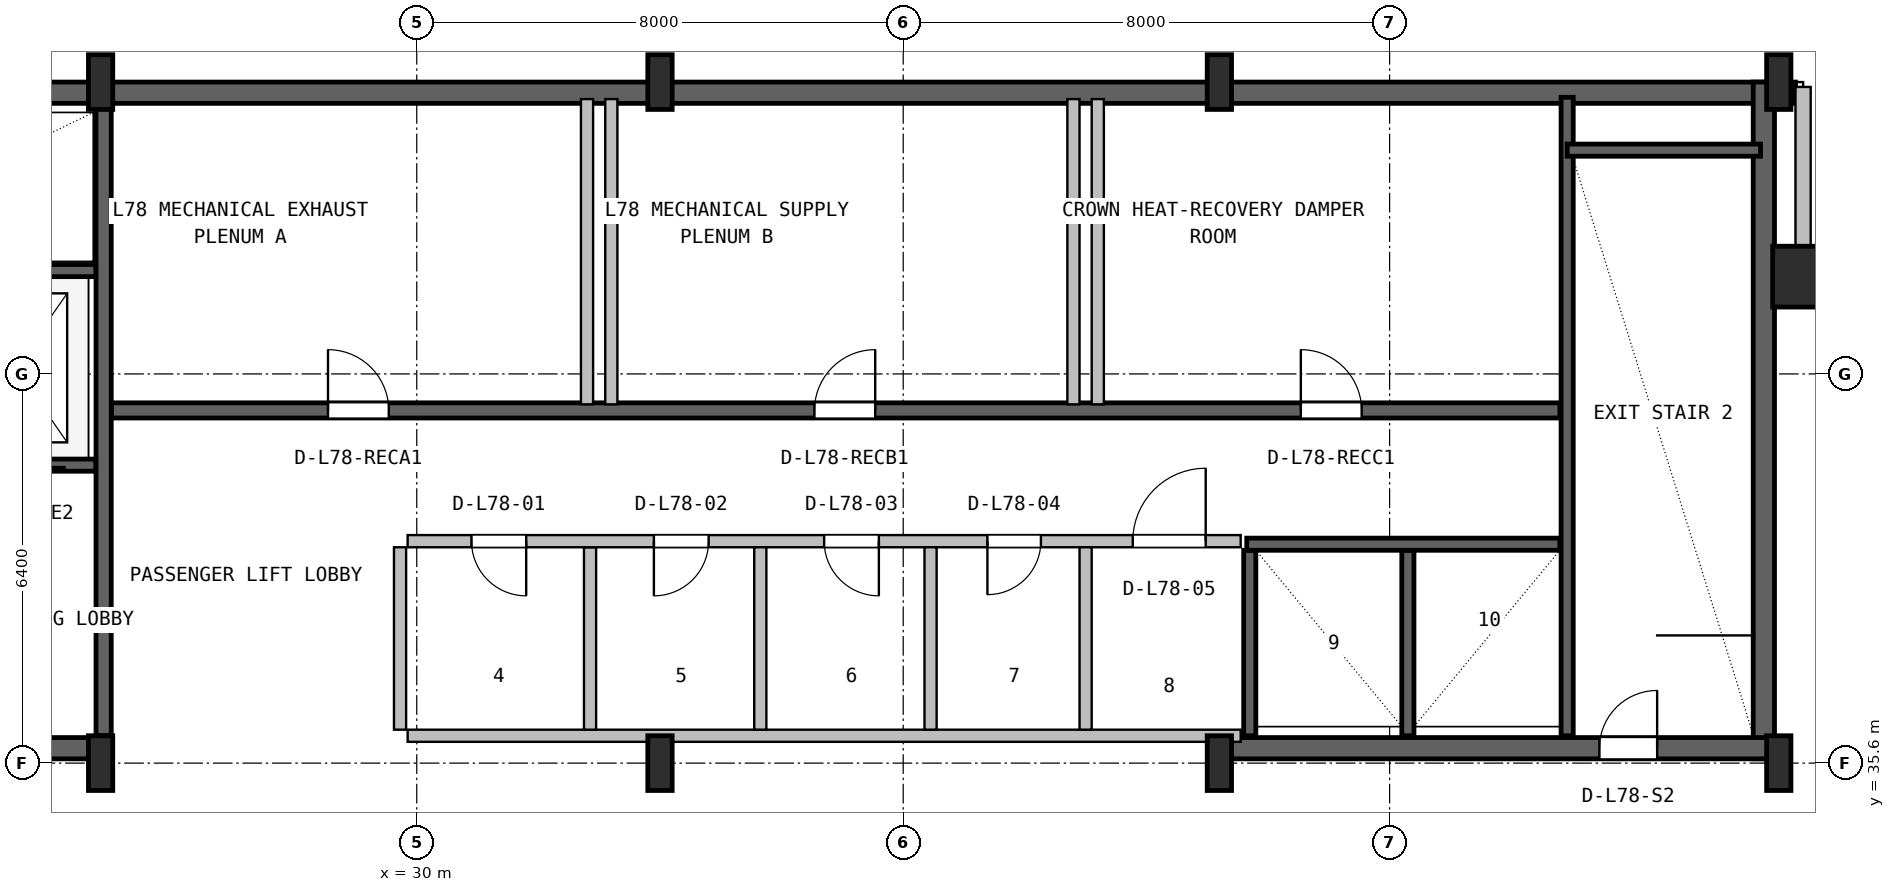
"""IFC4 building model, lengths in metres.
Left out: names, types, materials, properties, quantities, classifications, styles, units other than length and angle.
Written with IfcOpenShell. Run it as: python <this file> out.ifc"""

import sys

from ifc_helpers import new_model, si_unit, direction, frame, frame_2d, origin, origin_2d, place, context, subcontext, project, spatial, rectangle, hollow_rectangle, i_section, extrude, source, transform, mapped, element, fill, save


model = new_model("IFC4")
c1 = context("Model", 3, precision=1e-05, world=origin(), true_north=direction((0.0, 1.0)))
c2 = subcontext(c1, "Body", "Model", "MODEL_VIEW")
j1 = project(units=[si_unit("LENGTHUNIT", "METRE"), si_unit("PLANEANGLEUNIT", "RADIAN")], contexts=[c1])
p1 = place(None, origin())
s1 = spatial("IfcSite", under=j1, at=p1, CompositionType="ELEMENT")
p2 = place(p1, origin())
s2 = spatial("IfcBuilding", under=s1, at=p2, CompositionType="ELEMENT")
p3 = place(p2, frame((0.0, 0.0, 314.6)))
s3 = spatial("IfcBuildingStorey", under=s2, at=p3, CompositionType="ELEMENT", Elevation=314.6)
p4 = place(p3, frame((15.325, 46.625, 0.0), z_axis=(0.0, 0.0, 1.0), x_axis=(1.0, 0.0, 0.0)))
e1 = element("IfcWall", 1, at=p4, inside=s3, PredefinedType="SHEAR", context=c2, shape_type="SweptSolid", body=[
    extrude(rectangle(XDim=37.35, YDim=0.35, at=frame_2d((18.675, 0.0))), origin(), (0.0, 0.0, 1.0), 4.75),
])
p5 = place(p3, frame((52.155, 35.67, 0.0), z_axis=(0.0, 0.0, 1.0), x_axis=(0.0, 1.0, 0.0)))
e2 = element("IfcWall", 2, at=p5, inside=s3, PredefinedType="SHEAR", context=c2, shape_type="SweptSolid", body=[
    extrude(rectangle(XDim=11.13, YDim=0.35, at=frame_2d((5.565, 0.0))), origin(), (0.0, 0.0, 1.0), 4.75),
])
p6 = place(p3, frame((15.67, 35.845, 0.0), z_axis=(0.0, 0.0, 1.0), x_axis=(1.0, 0.0, 0.0)))
e3 = element("IfcWall", 3, at=p6, inside=s3, PredefinedType="SHEAR", context=c2, shape_type="SweptSolid", body=[
    extrude(rectangle(XDim=9.13, YDim=0.35, at=frame_2d((4.565, 0.0))), origin(), (0.0, 0.0, 1.0), 4.75),
])
p7 = place(p6, frame((5.4, 0.0, 0.0)))
e4 = element("IfcOpeningElement", 4, at=p7, cuts=e3, PredefinedType="OPENING", context=c2, shape_type="SweptSolid", body=[
    extrude(rectangle(XDim=1.0, YDim=2.1, at=frame_2d((0.5, 1.05))), frame((0.0, 0.185, 0.0), z_axis=(0.0, -1.0, 0.0), x_axis=(1.0, 0.0, 0.0)), (0.0, 0.0, 1.0), 0.37),
])
p8 = place(p3, frame((43.2, 35.845, 0.0), z_axis=(0.0, 0.0, 1.0), x_axis=(1.0, 0.0, 0.0)))
e5 = element("IfcWall", 5, at=p8, inside=s3, PredefinedType="SHEAR", context=c2, shape_type="SweptSolid", body=[
    extrude(rectangle(XDim=9.13, YDim=0.35, at=frame_2d((4.565, 0.0))), origin(), (0.0, 0.0, 1.0), 4.75),
])
p9 = place(p8, frame((6.25, 0.0, 0.0)))
e6 = element("IfcOpeningElement", 6, at=p9, cuts=e5, PredefinedType="OPENING", context=c2, shape_type="SweptSolid", body=[
    extrude(rectangle(XDim=0.95, YDim=2.1, at=frame_2d((0.475, 1.05))), frame((0.0, 0.185, 0.0), z_axis=(0.0, -1.0, 0.0), x_axis=(1.0, 0.0, 0.0)), (0.0, 0.0, 1.0), 0.37),
])
m1 = source(origin(), c2, "Body", "SweptSolid", [
    extrude(i_section(OverallWidth=0.4, OverallDepth=0.9, WebThickness=0.016, FlangeThickness=0.028, FilletRadius=0.016, at=origin_2d()), origin(), (0.0, 0.0, 1.0), 5.2),
])
for number, where, z_axis, x_axis in (
    (7, (24.8, 35.6, 0.0), (0.0, 0.0, 1.0), (1.0, 0.0, 0.0)),
    (8, (24.8, 46.8, 0.0), (0.0, 0.0, 1.0), (1.0, 0.0, 0.0)),
    (9, (34.0, 35.6, 0.0), (0.0, 0.0, 1.0), (1.0, 0.0, 0.0)),
    (10, (34.0, 46.8, 0.0), (0.0, 0.0, 1.0), (1.0, 0.0, 0.0)),
    (11, (43.2, 35.6, 0.0), (0.0, 0.0, 1.0), (1.0, 0.0, 0.0)),
    (12, (43.2, 46.8, 0.0), (0.0, 0.0, 1.0), (1.0, 0.0, 0.0)),
    (13, (52.4, 35.6, 0.0), (0.0, 0.0, 1.0), (1.0, 0.0, 0.0)),
    (14, (52.4, 46.8, 0.0), (0.0, 0.0, 1.0), (1.0, 0.0, 0.0)),
):
    element("IfcColumn", number, at=place(p3, frame(where, z_axis=z_axis, x_axis=x_axis)), inside=s3, PredefinedType="COLUMN", context=c2, shape_type="MappedRepresentation", body=[
        mapped(m1, transform((0.0, 0.0, 0.0), x_axis=(1.0, 0.0, 0.0), y_axis=(0.0, 1.0, 0.0), z_axis=(0.0, 0.0, 1.0), scale=1.0)),
    ])
m2 = source(origin(), c2, "Body", "SweptSolid", [
    extrude(hollow_rectangle(XDim=1.0, YDim=1.0, WallThickness=0.04, at=origin_2d()), origin(), (0.0, 0.0, 1.0), 5.2),
])
p10 = place(p3, frame((52.8, 43.6, 0.0), z_axis=(0.0, 0.0, 1.0), x_axis=(1.0, 0.0, 0.0)))
e15 = element("IfcColumn", 15, at=p10, inside=s3, PredefinedType="COLUMN", context=c2, shape_type="MappedRepresentation", body=[
    mapped(m2, transform((0.0, 0.0, 0.0), x_axis=(1.0, 0.0, 0.0), y_axis=(0.0, 1.0, 0.0), z_axis=(0.0, 0.0, 1.0), scale=1.0)),
])
p11 = place(p3, frame((52.93, 43.6, 0.0), z_axis=(0.0, 0.0, 1.0), x_axis=(1.0, 0.0, 0.0)))
e16 = element("IfcWall", 16, at=p11, inside=s3, PredefinedType="SOLIDWALL", context=c2, shape_type="SweptSolid", body=[
    extrude(rectangle(XDim=2.99, YDim=0.25, at=frame_2d((1.495, 0.0))), origin(), (0.0, 0.0, 1.0), 4.73),
])
p12 = place(p3, frame((52.8, 43.52, 0.0), z_axis=(0.0, 0.0, 1.0), x_axis=(0.0, 1.0, 0.0)))
e17 = element("IfcWall", 17, at=p12, inside=s3, PredefinedType="SOLIDWALL", context=c2, shape_type="SweptSolid", body=[
    extrude(rectangle(XDim=3.2, YDim=0.25, at=frame_2d((1.6, 0.0))), origin(), (0.0, 0.0, 1.0), 4.371),
])
p13 = place(p3, frame((24.85, 36.05, 0.0), z_axis=(0.0, 0.0, 1.0), x_axis=(0.0, 1.0, 0.0)))
e18 = element("IfcWall", 18, at=p13, inside=s3, PredefinedType="SHEAR", context=c2, shape_type="SweptSolid", body=[
    extrude(rectangle(XDim=10.45, YDim=0.25, at=frame_2d((5.225, 0.0))), origin(), (0.0, 0.0, 1.0), 4.75),
])
p14 = place(p3, frame((19.2, 40.5, 0.0), z_axis=(0.0, 0.0, 1.0), x_axis=(1.0, 0.0, 0.0)))
e19 = element("IfcWall", 19, at=p14, inside=s3, PredefinedType="SHEAR", context=c2, shape_type="SweptSolid", body=[
    extrude(rectangle(XDim=5.52, YDim=0.2, at=frame_2d((2.76, 0.0))), origin(), (0.0, 0.0, 1.0), 4.75),
])
p15 = place(p14, frame((1.05, 0.0, 0.0)))
e20 = element("IfcOpeningElement", 20, at=p15, cuts=e19, PredefinedType="OPENING", context=c2, shape_type="SweptSolid", body=[
    extrude(rectangle(XDim=1.1, YDim=2.18, at=frame_2d((0.55, 1.09))), frame((0.0, 0.11, 0.0), z_axis=(0.0, -1.0, 0.0), x_axis=(1.0, 0.0, 0.0)), (0.0, 0.0, 1.0), 0.22),
])
p16 = place(p14, frame((3.65, 0.0, 0.0)))
e21 = element("IfcOpeningElement", 21, at=p16, cuts=e19, PredefinedType="OPENING", context=c2, shape_type="SweptSolid", body=[
    extrude(rectangle(XDim=1.1, YDim=2.18, at=frame_2d((0.55, 1.09))), frame((0.0, 0.11, 0.0), z_axis=(0.0, -1.0, 0.0), x_axis=(1.0, 0.0, 0.0)), (0.0, 0.0, 1.0), 0.22),
])
p17 = place(p3, frame((19.2, 43.7, 0.0), z_axis=(0.0, 0.0, 1.0), x_axis=(1.0, 0.0, 0.0)))
e22 = element("IfcWall", 22, at=p17, inside=s3, PredefinedType="SHEAR", context=c2, shape_type="SweptSolid", body=[
    extrude(rectangle(XDim=5.52, YDim=0.2, at=frame_2d((2.76, 0.0))), origin(), (0.0, 0.0, 1.0), 4.75),
])
p18 = place(p3, frame((48.92, 36.05, 0.0), z_axis=(0.0, 0.0, 1.0), x_axis=(0.0, 1.0, 0.0)))
e23 = element("IfcWall", 23, at=p18, inside=s3, PredefinedType="SHEAR", context=c2, shape_type="SweptSolid", body=[
    extrude(rectangle(XDim=10.5, YDim=0.2, at=frame_2d((5.25, 0.0))), origin(), (0.0, 0.0, 1.0), 4.75),
])
p19 = place(p3, frame((48.92, 45.68, 0.0), z_axis=(0.0, 0.0, 1.0), x_axis=(1.0, 0.0, 0.0)))
e24 = element("IfcWall", 24, at=p19, inside=s3, PredefinedType="SHEAR", context=c2, shape_type="SweptSolid", body=[
    extrude(rectangle(XDim=3.18, YDim=0.2, at=frame_2d((1.59, 0.0))), origin(), (0.0, 0.0, 1.0), 4.75),
])
p20 = place(p3, frame((24.98, 41.4, 0.0), z_axis=(0.0, 0.0, 1.0), x_axis=(1.0, 0.0, 0.0)))
e25 = element("IfcWall", 25, at=p20, inside=s3, PredefinedType="SHEAR", context=c2, shape_type="SweptSolid", body=[
    extrude(rectangle(XDim=23.82, YDim=0.25, at=frame_2d((11.91, 0.0))), origin(), (0.0, 0.0, 1.0), 4.75),
])
p21 = place(p20, frame((3.56, 0.0, 0.0)))
e26 = element("IfcOpeningElement", 26, at=p21, cuts=e25, PredefinedType="OPENING", context=c2, shape_type="SweptSolid", body=[
    extrude(rectangle(XDim=1.0, YDim=2.08, at=frame_2d((0.5, 1.04))), frame((0.0, 0.135, 0.0), z_axis=(0.0, -1.0, 0.0), x_axis=(1.0, 0.0, 0.0)), (0.0, 0.0, 1.0), 0.27),
])
p22 = place(p20, frame((11.56, 0.0, 0.0)))
e27 = element("IfcOpeningElement", 27, at=p22, cuts=e25, PredefinedType="OPENING", context=c2, shape_type="SweptSolid", body=[
    extrude(rectangle(XDim=1.0, YDim=2.08, at=frame_2d((0.5, 1.04))), frame((0.0, 0.135, 0.0), z_axis=(0.0, -1.0, 0.0), x_axis=(1.0, 0.0, 0.0)), (0.0, 0.0, 1.0), 0.27),
])
p23 = place(p20, frame((19.56, 0.0, 0.0)))
e28 = element("IfcOpeningElement", 28, at=p23, cuts=e25, PredefinedType="OPENING", context=c2, shape_type="SweptSolid", body=[
    extrude(rectangle(XDim=1.0, YDim=2.08, at=frame_2d((0.5, 1.04))), frame((0.0, 0.135, 0.0), z_axis=(0.0, -1.0, 0.0), x_axis=(1.0, 0.0, 0.0)), (0.0, 0.0, 1.0), 0.27),
])
for number, where, z_axis, x_axis in (
    (29, (43.7, 36.05, 0.0), (0.0, 0.0, 1.0), (0.0, 1.0, 0.0)),
    (30, (46.3, 36.05, 0.0), (0.0, 0.0, 1.0), (0.0, 1.0, 0.0)),
):
    element("IfcWall", number, at=place(p3, frame(where, z_axis=z_axis, x_axis=x_axis)), inside=s3, PredefinedType="SHEAR", context=c2, shape_type="SweptSolid", body=[
        extrude(rectangle(XDim=3.05, YDim=0.2, at=frame_2d((1.525, 0.0))), origin(), (0.0, 0.0, 1.0), 4.75),
    ])
p24 = place(p3, frame((43.65, 39.2, 0.0), z_axis=(0.0, 0.0, 1.0), x_axis=(1.0, 0.0, 0.0)))
e31 = element("IfcWall", 31, at=p24, inside=s3, PredefinedType="SHEAR", context=c2, shape_type="SweptSolid", body=[
    extrude(rectangle(XDim=5.15, YDim=0.2, at=frame_2d((2.575, 0.0))), origin(), (0.0, 0.0, 1.0), 4.75),
])
p25 = place(p3, frame((29.85, 36.05, 0.0), z_axis=(0.0, 0.0, 1.0), x_axis=(1.0, 0.0, 0.0)))
e32 = element("IfcWall", 32, at=p25, inside=s3, PredefinedType="SOLIDWALL", context=c2, shape_type="SweptSolid", body=[
    extrude(rectangle(XDim=13.7, YDim=0.2, at=frame_2d((6.85, 0.0))), origin(), (0.0, 0.0, 1.0), 4.73),
])
p26 = place(p3, frame((32.85, 36.15, 0.0), z_axis=(0.0, 0.0, 1.0), x_axis=(0.0, 1.0, 0.0)))
e33 = element("IfcWall", 33, at=p26, inside=s3, PredefinedType="SOLIDWALL", context=c2, shape_type="SweptSolid", body=[
    extrude(rectangle(XDim=3.0, YDim=0.2, at=frame_2d((1.5, 0.0))), origin(), (0.0, 0.0, 1.0), 4.73),
])
p27 = place(p3, frame((29.85, 39.25, 0.0), z_axis=(0.0, 0.0, 1.0), x_axis=(1.0, 0.0, 0.0)))
e34 = element("IfcWall", 34, at=p27, inside=s3, PredefinedType="SOLIDWALL", context=c2, shape_type="SweptSolid", body=[
    extrude(rectangle(XDim=13.7, YDim=0.2, at=frame_2d((6.85, 0.0))), origin(), (0.0, 0.0, 1.0), 4.73),
])
p28 = place(p27, frame((1.05, 0.0, 0.0)))
e35 = element("IfcOpeningElement", 35, at=p28, cuts=e34, PredefinedType="OPENING", context=c2, shape_type="SweptSolid", body=[
    extrude(rectangle(XDim=0.9, YDim=2.06, at=frame_2d((0.45, 1.03))), frame((0.0, 0.11, 0.0), z_axis=(0.0, -1.0, 0.0), x_axis=(1.0, 0.0, 0.0)), (0.0, 0.0, 1.0), 0.22),
])
p29 = place(p27, frame((4.05, 0.0, 0.0)))
e36 = element("IfcOpeningElement", 36, at=p29, cuts=e34, PredefinedType="OPENING", context=c2, shape_type="SweptSolid", body=[
    extrude(rectangle(XDim=0.9, YDim=2.06, at=frame_2d((0.45, 1.03))), frame((0.0, 0.11, 0.0), z_axis=(0.0, -1.0, 0.0), x_axis=(1.0, 0.0, 0.0)), (0.0, 0.0, 1.0), 0.22),
])
p30 = place(p27, frame((6.85, 0.0, 0.0)))
e37 = element("IfcOpeningElement", 37, at=p30, cuts=e34, PredefinedType="OPENING", context=c2, shape_type="SweptSolid", body=[
    extrude(rectangle(XDim=0.9, YDim=2.06, at=frame_2d((0.45, 1.03))), frame((0.0, 0.11, 0.0), z_axis=(0.0, -1.0, 0.0), x_axis=(1.0, 0.0, 0.0)), (0.0, 0.0, 1.0), 0.22),
])
p31 = place(p27, frame((9.535, 0.0, 0.0)))
e38 = element("IfcOpeningElement", 38, at=p31, cuts=e34, PredefinedType="OPENING", context=c2, shape_type="SweptSolid", body=[
    extrude(rectangle(XDim=0.88, YDim=2.06, at=frame_2d((0.44, 1.03))), frame((0.0, 0.11, 0.0), z_axis=(0.0, -1.0, 0.0), x_axis=(1.0, 0.0, 0.0)), (0.0, 0.0, 1.0), 0.22),
])
p32 = place(p27, frame((11.925, 0.0, 0.0)))
e39 = element("IfcOpeningElement", 39, at=p32, cuts=e34, PredefinedType="OPENING", context=c2, shape_type="SweptSolid", body=[
    extrude(rectangle(XDim=1.2, YDim=2.1, at=frame_2d((0.6, 1.05))), frame((0.0, 0.11, 0.0), z_axis=(0.0, -1.0, 0.0), x_axis=(1.0, 0.0, 0.0)), (0.0, 0.0, 1.0), 0.22),
])
for number, where, z_axis, x_axis in (
    (40, (29.725, 36.15, 0.0), (0.0, 0.0, 1.0), (0.0, 1.0, 0.0)),
    (41, (35.65, 36.15, 0.0), (0.0, 0.0, 1.0), (0.0, 1.0, 0.0)),
    (42, (38.45, 36.15, 0.0), (0.0, 0.0, 1.0), (0.0, 1.0, 0.0)),
    (43, (41.0, 36.15, 0.0), (0.0, 0.0, 1.0), (0.0, 1.0, 0.0)),
):
    element("IfcWall", number, at=place(p3, frame(where, z_axis=z_axis, x_axis=x_axis)), inside=s3, PredefinedType="SOLIDWALL", context=c2, shape_type="SweptSolid", body=[
        extrude(rectangle(XDim=3.0, YDim=0.2, at=frame_2d((1.5, 0.0))), origin(), (0.0, 0.0, 1.0), 4.73),
    ])
for number, where, z_axis, x_axis in (
    (44, (32.8, 41.5, 0.0), (0.0, 0.0, 1.0), (0.0, 1.0, 0.0)),
    (45, (40.8, 41.5, 0.0), (0.0, 0.0, 1.0), (0.0, 1.0, 0.0)),
    (46, (33.2, 41.5, 0.0), (0.0, 0.0, 1.0), (0.0, 1.0, 0.0)),
    (47, (41.2, 41.5, 0.0), (0.0, 0.0, 1.0), (0.0, 1.0, 0.0)),
):
    element("IfcWall", number, at=place(p3, frame(where, z_axis=z_axis, x_axis=x_axis)), inside=s3, PredefinedType="SOLIDWALL", context=c2, shape_type="SweptSolid", body=[
        extrude(rectangle(XDim=5.02, YDim=0.2, at=frame_2d((2.51, 0.0))), origin(), (0.0, 0.0, 1.0), 3.525),
    ])
m3 = source(origin(), c2, "Body", "SweptSolid", [
    extrude(rectangle(XDim=0.95, YDim=2.1, at=frame_2d((0.475, 1.05))), frame((0.0, 0.025, 0.0), z_axis=(0.0, -1.0, 0.0), x_axis=(1.0, 0.0, 0.0)), (0.0, 0.0, 1.0), 0.05),
])
p33 = place(p9, origin())
e48 = element("IfcDoor", 48, at=p33, inside=s3, OperationType="SINGLE_SWING_RIGHT", PredefinedType="DOOR", context=c2, shape_type="MappedRepresentation", body=[
    mapped(m3, transform((0.0, 0.0, 0.0), x_axis=(1.0, 0.0, 0.0), y_axis=(0.0, 1.0, 0.0), z_axis=(0.0, 0.0, 1.0), scale=1.0)),
])
fill(e6, e48)
m4 = source(origin(), c2, "Body", "SweptSolid", [
    extrude(rectangle(XDim=1.0, YDim=2.08, at=frame_2d((0.5, 1.04))), frame((0.0, 0.025, 0.0), z_axis=(0.0, -1.0, 0.0), x_axis=(1.0, 0.0, 0.0)), (0.0, 0.0, 1.0), 0.05),
])
p34 = place(p21, origin())
e49 = element("IfcDoor", 49, at=p34, inside=s3, OperationType="SINGLE_SWING_LEFT", PredefinedType="DOOR", context=c2, shape_type="MappedRepresentation", body=[
    mapped(m4, transform((0.0, 0.0, 0.0), x_axis=(1.0, 0.0, 0.0), y_axis=(0.0, 1.0, 0.0), z_axis=(0.0, 0.0, 1.0), scale=1.0)),
])
fill(e26, e49)
p35 = place(p22, origin())
e50 = element("IfcDoor", 50, at=p35, inside=s3, OperationType="SINGLE_SWING_RIGHT", PredefinedType="DOOR", context=c2, shape_type="MappedRepresentation", body=[
    mapped(m4, transform((0.0, 0.0, 0.0), x_axis=(1.0, 0.0, 0.0), y_axis=(0.0, 1.0, 0.0), z_axis=(0.0, 0.0, 1.0), scale=1.0)),
])
fill(e27, e50)
p36 = place(p23, origin())
e51 = element("IfcDoor", 51, at=p36, inside=s3, OperationType="SINGLE_SWING_LEFT", PredefinedType="DOOR", context=c2, shape_type="MappedRepresentation", body=[
    mapped(m4, transform((0.0, 0.0, 0.0), x_axis=(1.0, 0.0, 0.0), y_axis=(0.0, 1.0, 0.0), z_axis=(0.0, 0.0, 1.0), scale=1.0)),
])
fill(e28, e51)
m5 = source(origin(), c2, "Body", "SweptSolid", [
    extrude(rectangle(XDim=0.9, YDim=2.06, at=frame_2d((0.45, 1.03))), frame((0.0, 0.025, 0.0), z_axis=(0.0, -1.0, 0.0), x_axis=(1.0, 0.0, 0.0)), (0.0, 0.0, 1.0), 0.05),
])
p37 = place(p28, frame((0.9, 0.0, 0.0), z_axis=(0.0, 0.0, 1.0), x_axis=(-1.0, 0.0, 0.0)))
e52 = element("IfcDoor", 52, at=p37, inside=s3, OperationType="SINGLE_SWING_RIGHT", PredefinedType="DOOR", context=c2, shape_type="MappedRepresentation", body=[
    mapped(m5, transform((0.0, 0.0, 0.0), x_axis=(1.0, 0.0, 0.0), y_axis=(0.0, 1.0, 0.0), z_axis=(0.0, 0.0, 1.0), scale=1.0)),
])
fill(e35, e52)
p38 = place(p29, frame((0.9, 0.0, 0.0), z_axis=(0.0, 0.0, 1.0), x_axis=(-1.0, 0.0, 0.0)))
e53 = element("IfcDoor", 53, at=p38, inside=s3, OperationType="SINGLE_SWING_LEFT", PredefinedType="DOOR", context=c2, shape_type="MappedRepresentation", body=[
    mapped(m5, transform((0.0, 0.0, 0.0), x_axis=(1.0, 0.0, 0.0), y_axis=(0.0, 1.0, 0.0), z_axis=(0.0, 0.0, 1.0), scale=1.0)),
])
fill(e36, e53)
p39 = place(p30, frame((0.9, 0.0, 0.0), z_axis=(0.0, 0.0, 1.0), x_axis=(-1.0, 0.0, 0.0)))
e54 = element("IfcDoor", 54, at=p39, inside=s3, OperationType="SINGLE_SWING_RIGHT", PredefinedType="DOOR", context=c2, shape_type="MappedRepresentation", body=[
    mapped(m5, transform((0.0, 0.0, 0.0), x_axis=(1.0, 0.0, 0.0), y_axis=(0.0, 1.0, 0.0), z_axis=(0.0, 0.0, 1.0), scale=1.0)),
])
fill(e37, e54)
m6 = source(origin(), c2, "Body", "SweptSolid", [
    extrude(rectangle(XDim=0.88, YDim=2.06, at=frame_2d((0.44, 1.03))), frame((0.0, 0.025, 0.0), z_axis=(0.0, -1.0, 0.0), x_axis=(1.0, 0.0, 0.0)), (0.0, 0.0, 1.0), 0.05),
])
p40 = place(p31, frame((0.88, 0.0, 0.0), z_axis=(0.0, 0.0, 1.0), x_axis=(-1.0, 0.0, 0.0)))
e55 = element("IfcDoor", 55, at=p40, inside=s3, OperationType="SINGLE_SWING_LEFT", PredefinedType="DOOR", context=c2, shape_type="MappedRepresentation", body=[
    mapped(m6, transform((0.0, 0.0, 0.0), x_axis=(1.0, 0.0, 0.0), y_axis=(0.0, 1.0, 0.0), z_axis=(0.0, 0.0, 1.0), scale=1.0)),
])
fill(e38, e55)
m7 = source(origin(), c2, "Body", "SweptSolid", [
    extrude(rectangle(XDim=1.2, YDim=2.1, at=frame_2d((0.6, 1.05))), frame((0.0, 0.025, 0.0), z_axis=(0.0, -1.0, 0.0), x_axis=(1.0, 0.0, 0.0)), (0.0, 0.0, 1.0), 0.05),
])
p41 = place(p32, origin())
e56 = element("IfcDoor", 56, at=p41, inside=s3, OperationType="SINGLE_SWING_RIGHT", PredefinedType="DOOR", context=c2, shape_type="MappedRepresentation", body=[
    mapped(m7, transform((0.0, 0.0, 0.0), x_axis=(1.0, 0.0, 0.0), y_axis=(0.0, 1.0, 0.0), z_axis=(0.0, 0.0, 1.0), scale=1.0)),
])
fill(e39, e56)
save(model, sys.argv[1])
